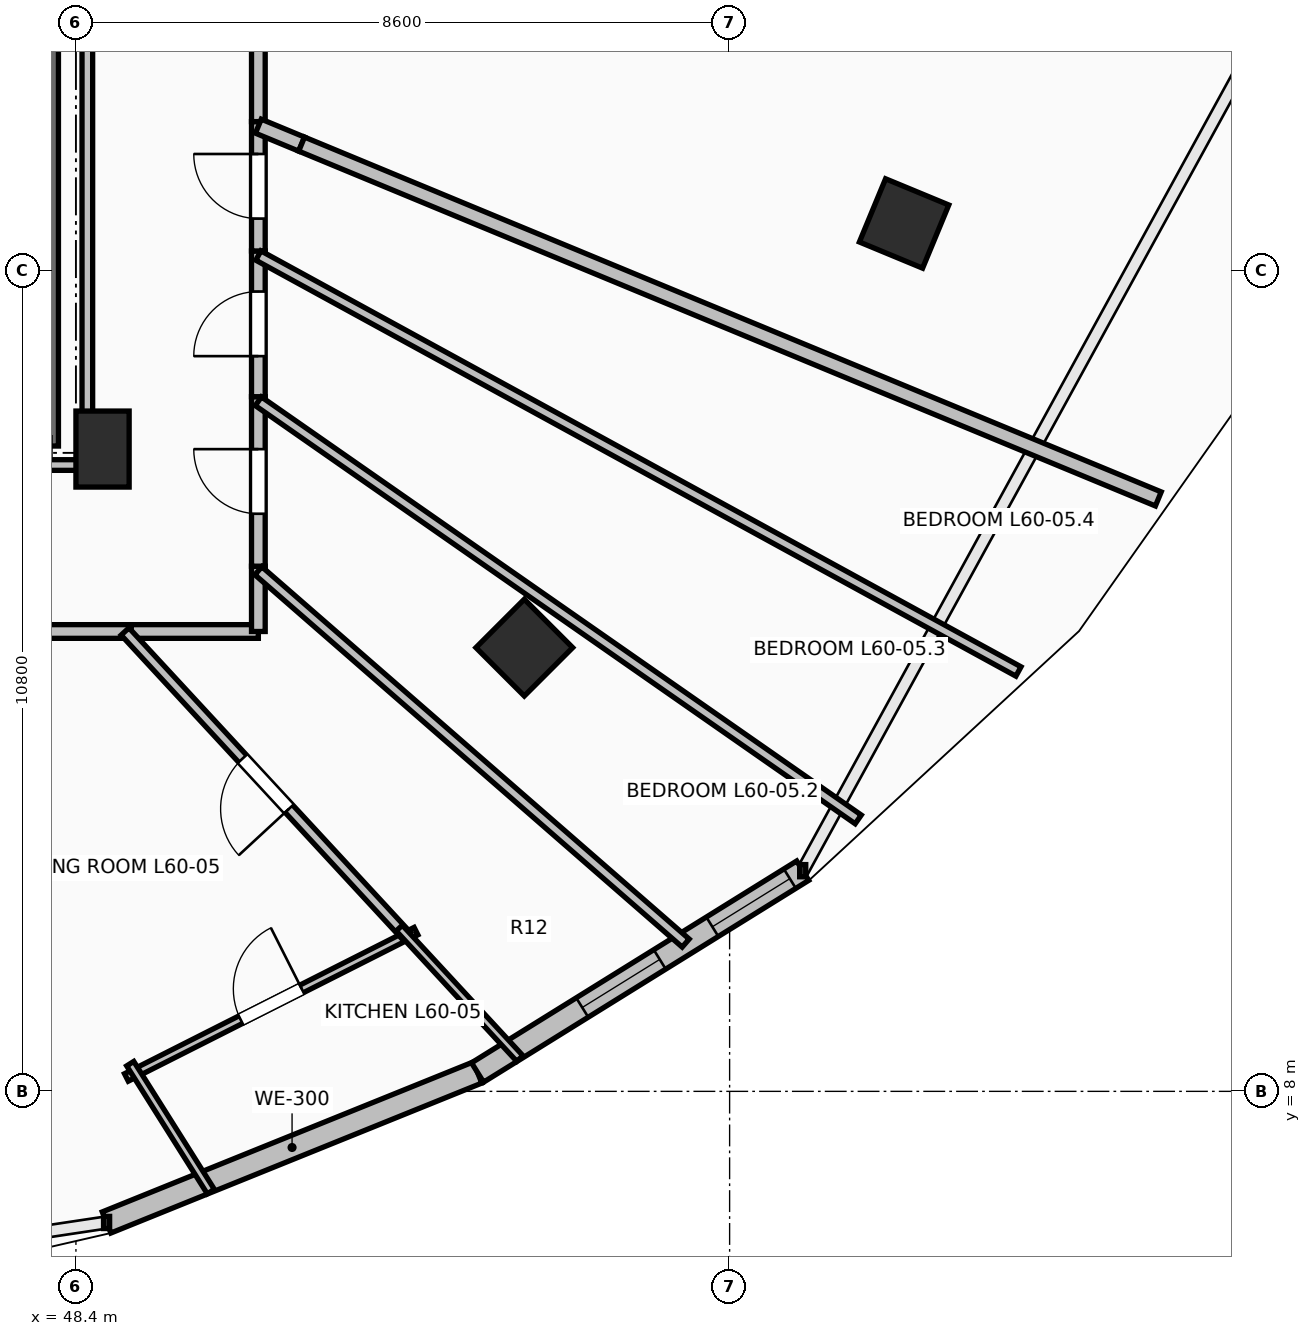
"""IFC4 building model, lengths in metres.
Left out: names, types, materials, properties, quantities, classifications, styles, units other than length and angle.
Written with IfcOpenShell. Run it as: python <this file> out.ifc"""

import sys

from ifc_helpers import new_model, si_unit, direction, frame, frame_2d, origin, origin_2d, place, context, subcontext, project, spatial, rectangle, extrude, element, fill, save


model = new_model("IFC4")
c1 = context("Model", 3, precision=1e-05, world=origin(), true_north=direction((0.0, 1.0)))
c2 = subcontext(c1, "Body", "Model", "MODEL_VIEW")
j1 = project(units=[si_unit("LENGTHUNIT", "METRE"), si_unit("PLANEANGLEUNIT", "RADIAN")], contexts=[c1])
p1 = place(None, origin())
s1 = spatial("IfcSite", under=j1, at=p1, CompositionType="ELEMENT")
p2 = place(p1, origin())
s2 = spatial("IfcBuilding", under=s1, at=p2, CompositionType="ELEMENT")
p3 = place(p2, frame((0.0, 0.0, 221.4)))
s3 = spatial("IfcBuildingStorey", under=s2, at=p3, CompositionType="ELEMENT", Elevation=221.4)
for number, where, z_axis, x_axis in (
    (1, (54.299, 13.838, 0.0), (0.0, 0.0, 1.0), (0.707, -0.707, 0.0)),
    (2, (59.295, 19.418, 0.0), (0.0, 0.0, 1.0), (0.924, -0.383, 0.0)),
):
    element("IfcColumn", number, at=place(p3, frame(where, z_axis=z_axis, x_axis=x_axis)), inside=s3, PredefinedType="COLUMN", context=c2, shape_type="SweptSolid", body=[
        extrude(rectangle(XDim=0.9, YDim=0.9, at=origin_2d()), origin(), (0.0, 0.0, 1.0), 3.55),
    ])
p4 = place(p3, frame((48.75, 16.45, 0.0), z_axis=(0.0, 0.0, 1.0), x_axis=(1.0, 0.0, 0.0)))
e3 = element("IfcColumn", 3, at=p4, inside=s3, PredefinedType="PILASTER", context=c2, shape_type="SweptSolid", body=[
    extrude(rectangle(XDim=0.7, YDim=1.0, at=origin_2d()), origin(), (0.0, 0.0, 1.0), 3.55),
])
p5 = place(p3, frame((48.803, 6.275, 0.0), z_axis=(0.0, 0.0, 1.0), x_axis=(0.927111094334, 0.374786630981, 0.0)))
e4 = element("IfcWall", 4, at=p5, inside=s3, PredefinedType="STANDARD", context=c2, shape_type="SweptSolid", body=[
    extrude(rectangle(XDim=5.264, YDim=0.3, at=frame_2d((2.632, 0.0))), origin(), (0.0, 0.0, 1.0), 3.2),
])
p6 = place(p3, frame((53.684, 8.248, 0.0), z_axis=(0.0, 0.0, 1.0), x_axis=(0.849647657754, 0.527350791858, 0.0)))
e5 = element("IfcWall", 5, at=p6, inside=s3, PredefinedType="STANDARD", context=c2, shape_type="SweptSolid", body=[
    extrude(rectangle(XDim=5.035, YDim=0.3, at=frame_2d((2.518, 0.0))), origin(), (0.0, 0.0, 1.0), 3.2),
])
p7 = place(p6, frame((1.621, 0.0, 0.85)))
e6 = element("IfcOpeningElement", 6, at=p7, cuts=e5, PredefinedType="OPENING", context=c2, shape_type="SweptSolid", body=[
    extrude(rectangle(XDim=1.2, YDim=1.95, at=frame_2d((0.6, 0.975))), frame((0.0, 0.165, 0.0), z_axis=(0.0, -1.0, 0.0), x_axis=(1.0, 0.0, 0.0)), (0.0, 0.0, 1.0), 0.33),
])
p8 = place(p6, frame((3.636, 0.0, 0.85)))
e7 = element("IfcOpeningElement", 7, at=p8, cuts=e5, PredefinedType="OPENING", context=c2, shape_type="SweptSolid", body=[
    extrude(rectangle(XDim=1.2, YDim=1.95, at=frame_2d((0.6, 0.975))), frame((0.0, 0.165, 0.0), z_axis=(0.0, -1.0, 0.0), x_axis=(1.0, 0.0, 0.0)), (0.0, 0.0, 1.0), 0.33),
])
p9 = place(p3, frame((48.06, 23.91, 0.0), z_axis=(0.0, 0.0, 1.0), x_axis=(0.0, -1.0, 0.0)))
e8 = element("IfcWall", 8, at=p9, inside=s3, PredefinedType="SOLIDWALL", context=c2, shape_type="SweptSolid", body=[
    extrude(rectangle(XDim=7.42, YDim=0.22, at=frame_2d((3.71, 0.0))), origin(), (0.0, 0.0, 1.0), 3.2),
])
p10 = place(p3, frame((45.237, 14.05, 0.0), z_axis=(0.0, 0.0, 1.0), x_axis=(1.0, 0.0, 0.0)))
e9 = element("IfcWall", 9, at=p10, inside=s3, PredefinedType="PARTITIONING", context=c2, shape_type="SweptSolid", body=[
    extrude(rectangle(XDim=3.891, YDim=0.18, at=frame_2d((1.945, 0.0))), origin(), (0.0, 0.0, 1.0), 2.392),
])
p11 = place(p10, frame((1.446, 0.0, 0.0)))
e10 = element("IfcOpeningElement", 10, at=p11, cuts=e9, PredefinedType="OPENING", context=c2, shape_type="SweptSolid", body=[
    extrude(rectangle(XDim=1.0, YDim=2.15, at=frame_2d((0.5, 1.075))), frame((0.0, 0.105, 0.0), z_axis=(0.0, -1.0, 0.0), x_axis=(1.0, 0.0, 0.0)), (0.0, 0.0, 1.0), 0.21),
])
p12 = place(p3, frame((49.128, 14.05, 0.0), z_axis=(0.0, 0.0, 1.0), x_axis=(1.0, 0.0, 0.0)))
e11 = element("IfcWall", 11, at=p12, inside=s3, PredefinedType="PARTITIONING", context=c2, shape_type="SweptSolid", body=[
    extrude(rectangle(XDim=1.672, YDim=0.18, at=frame_2d((0.836, 0.0))), origin(), (0.0, 0.0, 1.0), 2.889),
])
p13 = place(p3, frame((50.8, 14.05, 0.0), z_axis=(0.0, 0.0, 1.0), x_axis=(0.0, 1.0, 0.0)))
e12 = element("IfcWall", 12, at=p13, inside=s3, PredefinedType="PARTITIONING", context=c2, shape_type="SweptSolid", body=[
    extrude(rectangle(XDim=0.859, YDim=0.18, at=frame_2d((0.429, 0.0))), origin(), (0.0, 0.0, 1.0), 2.889),
])
p14 = place(p3, frame((50.8, 14.909, 0.0), z_axis=(0.0, 0.0, 1.0), x_axis=(0.0, 1.0, 0.0)))
e13 = element("IfcWall", 13, at=p14, inside=s3, PredefinedType="PARTITIONING", context=c2, shape_type="SweptSolid", body=[
    extrude(rectangle(XDim=2.23, YDim=0.18, at=frame_2d((1.115, 0.0))), origin(), (0.0, 0.0, 1.0), 2.392),
])
p15 = place(p14, frame((0.69, 0.0, 0.0)))
e14 = element("IfcOpeningElement", 14, at=p15, cuts=e13, PredefinedType="OPENING", context=c2, shape_type="SweptSolid", body=[
    extrude(rectangle(XDim=0.85, YDim=2.1, at=frame_2d((0.425, 1.05))), frame((0.0, 0.105, 0.0), z_axis=(0.0, -1.0, 0.0), x_axis=(1.0, 0.0, 0.0)), (0.0, 0.0, 1.0), 0.21),
])
p16 = place(p3, frame((50.8, 17.139, 0.0), z_axis=(0.0, 0.0, 1.0), x_axis=(0.0, 1.0, 0.0)))
e15 = element("IfcWall", 15, at=p16, inside=s3, PredefinedType="PARTITIONING", context=c2, shape_type="SweptSolid", body=[
    extrude(rectangle(XDim=1.917, YDim=0.18, at=frame_2d((0.958, 0.0))), origin(), (0.0, 0.0, 1.0), 3.2),
])
p17 = place(p16, frame((0.533, 0.0, 0.0)))
e16 = element("IfcOpeningElement", 16, at=p17, cuts=e15, PredefinedType="OPENING", context=c2, shape_type="SweptSolid", body=[
    extrude(rectangle(XDim=0.85, YDim=2.1, at=frame_2d((0.425, 1.05))), frame((0.0, 0.105, 0.0), z_axis=(0.0, -1.0, 0.0), x_axis=(1.0, 0.0, 0.0)), (0.0, 0.0, 1.0), 0.21),
])
p18 = place(p3, frame((50.8, 19.056, 0.0), z_axis=(0.0, 0.0, 1.0), x_axis=(0.0, 1.0, 0.0)))
e17 = element("IfcWall", 17, at=p18, inside=s3, PredefinedType="PARTITIONING", context=c2, shape_type="SweptSolid", body=[
    extrude(rectangle(XDim=1.702, YDim=0.18, at=frame_2d((0.851, 0.0))), origin(), (0.0, 0.0, 1.0), 3.2),
])
p19 = place(p18, frame((0.426, 0.0, 0.0)))
e18 = element("IfcOpeningElement", 18, at=p19, cuts=e17, PredefinedType="OPENING", context=c2, shape_type="SweptSolid", body=[
    extrude(rectangle(XDim=0.85, YDim=2.1, at=frame_2d((0.425, 1.05))), frame((0.0, 0.105, 0.0), z_axis=(0.0, -1.0, 0.0), x_axis=(1.0, 0.0, 0.0)), (0.0, 0.0, 1.0), 0.21),
])
p20 = place(p3, frame((50.8, 20.758, 0.0), z_axis=(0.0, 0.0, 1.0), x_axis=(0.0, 1.0, 0.0)))
e19 = element("IfcWall", 19, at=p20, inside=s3, PredefinedType="PARTITIONING", context=c2, shape_type="SweptSolid", body=[
    extrude(rectangle(XDim=3.792, YDim=0.18, at=frame_2d((1.896, 0.0))), origin(), (0.0, 0.0, 1.0), 3.2),
])
p21 = place(p3, frame((49.064, 8.183, 0.0), z_axis=(0.0, 0.0, 1.0), x_axis=(0.892520393298, 0.451007037136, 0.0)))
e20 = element("IfcWall", 20, at=p21, inside=s3, PredefinedType="PARTITIONING", context=c2, shape_type="SweptSolid", body=[
    extrude(rectangle(XDim=4.269, YDim=0.11, at=frame_2d((2.134, 0.0))), origin(), (0.0, 0.0, 1.0), 3.2),
])
p22 = place(p21, frame((1.684, 0.0, 0.0)))
e21 = element("IfcOpeningElement", 21, at=p22, cuts=e20, PredefinedType="OPENING", context=c2, shape_type="SweptSolid", body=[
    extrude(rectangle(XDim=0.9, YDim=2.1, at=frame_2d((0.45, 1.05))), frame((0.0, 0.07, 0.0), z_axis=(0.0, -1.0, 0.0), x_axis=(1.0, 0.0, 0.0)), (0.0, 0.0, 1.0), 0.14),
])
p23 = place(p3, frame((50.175, 6.681, 0.0), z_axis=(0.0, 0.0, 1.0), x_axis=(-0.532930456912, 0.846159044208, 0.0)))
e22 = element("IfcWall", 22, at=p23, inside=s3, PredefinedType="PARTITIONING", context=c2, shape_type="SweptSolid", body=[
    extrude(rectangle(XDim=1.989, YDim=0.11, at=frame_2d((0.995, 0.0))), origin(), (0.0, 0.0, 1.0), 3.2),
])
p24 = place(p3, frame((52.749, 10.045, 0.0), z_axis=(0.0, 0.0, 1.0), x_axis=(-0.678882171058, 0.734247232081, 0.0)))
e23 = element("IfcWall", 23, at=p24, inside=s3, PredefinedType="PARTITIONING", context=c2, shape_type="SweptSolid", body=[
    extrude(rectangle(XDim=5.455, YDim=0.14, at=frame_2d((2.728, 0.0))), origin(), (0.0, 0.0, 1.0), 2.734),
])
p25 = place(p24, frame((2.277, 0.0, 0.0)))
e24 = element("IfcOpeningElement", 24, at=p25, cuts=e23, PredefinedType="OPENING", context=c2, shape_type="SweptSolid", body=[
    extrude(rectangle(XDim=0.9, YDim=2.1, at=frame_2d((0.45, 1.05))), frame((0.0, 0.085, 0.0), z_axis=(0.0, -1.0, 0.0), x_axis=(1.0, 0.0, 0.0)), (0.0, 0.0, 1.0), 0.17),
])
p26 = place(p3, frame((54.24, 8.432, 0.0), z_axis=(0.0, 0.0, 1.0), x_axis=(-0.678818101482, 0.734306465381, 0.0)))
e25 = element("IfcWall", 25, at=p26, inside=s3, PredefinedType="PARTITIONING", context=c2, shape_type="SweptSolid", body=[
    extrude(rectangle(XDim=2.336, YDim=0.11, at=frame_2d((1.168, 0.0))), origin(), (0.0, 0.0, 1.0), 3.2),
])
p27 = place(p3, frame((56.422, 9.951, 0.0), z_axis=(0.0, 0.0, 1.0), x_axis=(-0.753978537067, 0.656899052856, 0.0)))
e26 = element("IfcWall", 26, at=p27, inside=s3, PredefinedType="PARTITIONING", context=c2, shape_type="SweptSolid", body=[
    extrude(rectangle(XDim=7.457, YDim=0.14, at=frame_2d((3.728, 0.0))), origin(), (0.0, 0.0, 1.0), 2.734),
])
p28 = place(p3, frame((58.692, 11.578, 0.0), z_axis=(0.0, 0.0, 1.0), x_axis=(-0.820357038452, 0.571851667361, 0.0)))
e27 = element("IfcWall", 27, at=p28, inside=s3, PredefinedType="PARTITIONING", context=c2, shape_type="SweptSolid", body=[
    extrude(rectangle(XDim=9.62, YDim=0.14, at=frame_2d((4.81, 0.0))), origin(), (0.0, 0.0, 1.0), 2.734),
])
p29 = place(p3, frame((60.8, 13.524, 0.0), z_axis=(0.0, 0.0, 1.0), x_axis=(-0.877244884683, 0.480043135871, 0.0)))
e28 = element("IfcWall", 28, at=p29, inside=s3, PredefinedType="PARTITIONING", context=c2, shape_type="SweptSolid", body=[
    extrude(rectangle(XDim=11.399, YDim=0.14, at=frame_2d((5.7, 0.0))), origin(), (0.0, 0.0, 1.0), 2.734),
])
p30 = place(p3, frame((51.369, 20.462, 0.0), z_axis=(0.0, 0.0, 1.0), x_axis=(-0.923615496363, 0.383320251066, 0.0)))
e29 = element("IfcWall", 29, at=p30, inside=s3, PredefinedType="PARTITIONING", context=c2, shape_type="SweptSolid", body=[
    extrude(rectangle(XDim=0.616, YDim=0.2, at=frame_2d((0.308, 0.0))), origin(), (0.0, 0.0, 1.0), 3.2),
])
p31 = place(p3, frame((62.64, 15.794, 0.0), z_axis=(0.0, 0.0, 1.0), x_axis=(-0.923897809723, 0.382639304291, 0.0)))
e30 = element("IfcWall", 30, at=p31, inside=s3, PredefinedType="PARTITIONING", context=c2, shape_type="SweptSolid", body=[
    extrude(rectangle(XDim=12.199, YDim=0.2, at=frame_2d((6.1, 0.0))), origin(), (0.0, 0.0, 1.0), 2.734),
])
p32 = place(p3, frame((48.55, 16.24, 0.0), z_axis=(0.0, 0.0, 1.0), x_axis=(0.0, 1.0, 0.0)))
e31 = element("IfcWall", 31, at=p32, inside=s3, PredefinedType="PARTITIONING", context=c2, shape_type="SweptSolid", body=[
    extrude(rectangle(XDim=7.514, YDim=0.14, at=frame_2d((3.757, 0.0))), origin(), (0.0, 0.0, 1.0), 2.392),
])
p33 = place(p3, frame((44.805, 16.24, 0.0), z_axis=(0.0, 0.0, 1.0), x_axis=(1.0, 0.0, 0.0)))
e32 = element("IfcWall", 32, at=p33, inside=s3, PredefinedType="PARTITIONING", context=c2, shape_type="SweptSolid", body=[
    extrude(rectangle(XDim=3.745, YDim=0.14, at=frame_2d((1.873, 0.0))), origin(), (0.0, 0.0, 1.0), 2.392),
])
p34 = place(p7, origin())
e33 = element("IfcWindow", 33, at=p34, inside=s3, PartitioningType="SINGLE_PANEL", PredefinedType="WINDOW", context=c2, shape_type="SweptSolid", body=[
    extrude(rectangle(XDim=1.2, YDim=1.95, at=frame_2d((0.6, 0.975))), frame((0.0, 0.03, 0.0), z_axis=(0.0, -1.0, 0.0), x_axis=(1.0, 0.0, 0.0)), (0.0, 0.0, 1.0), 0.06),
])
fill(e6, e33)
p35 = place(p8, origin())
e34 = element("IfcWindow", 34, at=p35, inside=s3, PartitioningType="SINGLE_PANEL", PredefinedType="WINDOW", context=c2, shape_type="SweptSolid", body=[
    extrude(rectangle(XDim=1.2, YDim=1.95, at=frame_2d((0.6, 0.975))), frame((0.0, 0.03, 0.0), z_axis=(0.0, -1.0, 0.0), x_axis=(1.0, 0.0, 0.0)), (0.0, 0.0, 1.0), 0.06),
])
fill(e7, e34)
p36 = place(p22, origin())
e35 = element("IfcDoor", 35, at=p36, inside=s3, OperationType="SINGLE_SWING_RIGHT", PredefinedType="DOOR", context=c2, shape_type="SweptSolid", body=[
    extrude(rectangle(XDim=0.9, YDim=2.1, at=frame_2d((0.45, 1.05))), frame((0.0, 0.025, 0.0), z_axis=(0.0, -1.0, 0.0), x_axis=(1.0, 0.0, 0.0)), (0.0, 0.0, 1.0), 0.05),
])
fill(e21, e35)
p37 = place(p25, origin())
e36 = element("IfcDoor", 36, at=p37, inside=s3, OperationType="SINGLE_SWING_LEFT", PredefinedType="DOOR", context=c2, shape_type="SweptSolid", body=[
    extrude(rectangle(XDim=0.9, YDim=2.1, at=frame_2d((0.45, 1.05))), frame((0.0, 0.025, 0.0), z_axis=(0.0, -1.0, 0.0), x_axis=(1.0, 0.0, 0.0)), (0.0, 0.0, 1.0), 0.05),
])
fill(e24, e36)
p38 = place(p15, origin())
e37 = element("IfcDoor", 37, at=p38, inside=s3, OperationType="SINGLE_SWING_RIGHT", PredefinedType="DOOR", context=c2, shape_type="SweptSolid", body=[
    extrude(rectangle(XDim=0.85, YDim=2.1, at=frame_2d((0.425, 1.05))), frame((0.0, 0.025, 0.0), z_axis=(0.0, -1.0, 0.0), x_axis=(1.0, 0.0, 0.0)), (0.0, 0.0, 1.0), 0.05),
])
fill(e14, e37)
p39 = place(p17, origin())
e38 = element("IfcDoor", 38, at=p39, inside=s3, OperationType="SINGLE_SWING_LEFT", PredefinedType="DOOR", context=c2, shape_type="SweptSolid", body=[
    extrude(rectangle(XDim=0.85, YDim=2.1, at=frame_2d((0.425, 1.05))), frame((0.0, 0.025, 0.0), z_axis=(0.0, -1.0, 0.0), x_axis=(1.0, 0.0, 0.0)), (0.0, 0.0, 1.0), 0.05),
])
fill(e16, e38)
p40 = place(p19, origin())
e39 = element("IfcDoor", 39, at=p40, inside=s3, OperationType="SINGLE_SWING_RIGHT", PredefinedType="DOOR", context=c2, shape_type="SweptSolid", body=[
    extrude(rectangle(XDim=0.85, YDim=2.1, at=frame_2d((0.425, 1.05))), frame((0.0, 0.025, 0.0), z_axis=(0.0, -1.0, 0.0), x_axis=(1.0, 0.0, 0.0)), (0.0, 0.0, 1.0), 0.05),
])
fill(e18, e39)
save(model, sys.argv[1])
